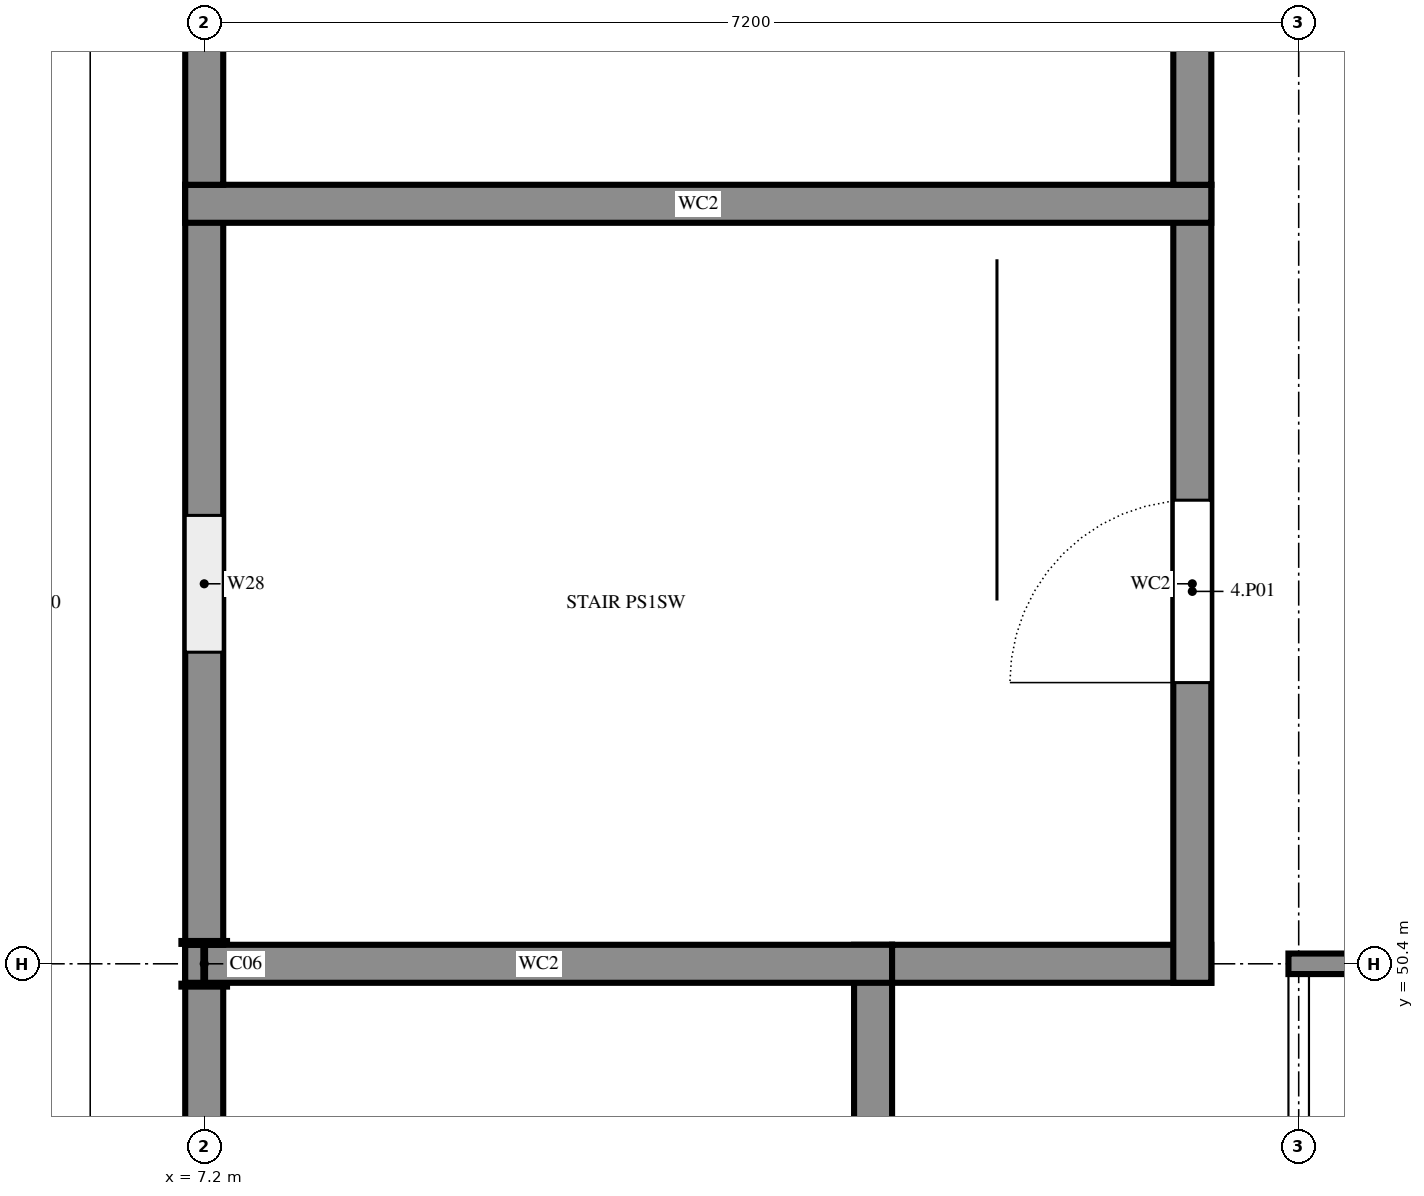
"""IFC4 building model, lengths in metres.
Left out: names, types, materials, properties, quantities, classifications, styles, units other than length and angle.
Written with IfcOpenShell. Run it as: python <this file> out.ifc"""

import sys

from ifc_helpers import new_model, si_unit, direction, frame, frame_2d, origin, origin_2d, place, context, subcontext, project, spatial, rectangle, i_section, extrude, element, fill, save


model = new_model("IFC4")
c1 = context("Model", 3, precision=1e-05, world=origin(), true_north=direction((0.0, 1.0)))
c2 = subcontext(c1, "Body", "Model", "MODEL_VIEW")
j1 = project(units=[si_unit("LENGTHUNIT", "METRE"), si_unit("PLANEANGLEUNIT", "RADIAN")], contexts=[c1])
p1 = place(None, origin())
s1 = spatial("IfcSite", under=j1, at=p1, CompositionType="ELEMENT")
p2 = place(p1, origin())
s2 = spatial("IfcBuilding", under=s1, at=p2, CompositionType="ELEMENT")
p3 = place(p2, frame((0.0, 0.0, 14.4)))
s3 = spatial("IfcBuildingStorey", under=s2, at=p3, CompositionType="ELEMENT", Elevation=14.4)
p4 = place(p3, frame((7.2, 50.4, 0.0), z_axis=(0.0, 0.0, 1.0), x_axis=(1.0, 0.0, 0.0)))
e1 = element("IfcColumn", 1, at=p4, inside=s3, PredefinedType="COLUMN", context=c2, shape_type="SweptSolid", body=[
    extrude(i_section(OverallWidth=0.3, OverallDepth=0.3, WebThickness=0.011, FlangeThickness=0.019, FilletRadius=0.027, at=origin_2d()), origin(), (0.0, 0.0, 1.0), 3.6),
])
p5 = place(p3, frame((11.6, 44.275, 0.0), z_axis=(0.0, 0.0, 1.0), x_axis=(0.0, 1.0, 0.0)))
e2 = element("IfcWall", 2, at=p5, inside=s3, PredefinedType="SHEAR", context=c2, shape_type="SweptSolid", body=[
    extrude(rectangle(XDim=6.25, YDim=0.25, at=frame_2d((3.125, 0.0))), origin(), (0.0, 0.0, 1.0), 3.6),
])
p6 = place(p5, frame((0.375, 0.0, 0.0)))
e3 = element("IfcOpeningElement", 3, at=p6, cuts=e2, PredefinedType="OPENING", context=c2, shape_type="SweptSolid", body=[
    extrude(rectangle(XDim=1.0, YDim=2.4, at=frame_2d((0.5, 1.2))), frame((0.0, 0.135, 0.0), z_axis=(0.0, -1.0, 0.0), x_axis=(1.0, 0.0, 0.0)), (0.0, 0.0, 1.0), 0.27),
])
p7 = place(p3, frame((7.2, 50.525, 0.0), z_axis=(0.0, 0.0, 1.0), x_axis=(0.0, -1.0, 0.0)))
e4 = element("IfcWall", 4, at=p7, inside=s3, PredefinedType="SHEAR", context=c2, shape_type="SweptSolid", body=[
    extrude(rectangle(XDim=6.25, YDim=0.25, at=frame_2d((3.125, 0.0))), origin(), (0.0, 0.0, 1.0), 3.6),
])
p8 = place(p7, frame((2.675, 0.0, 0.6)))
e5 = element("IfcOpeningElement", 5, at=p8, cuts=e4, PredefinedType="OPENING", context=c2, shape_type="SweptSolid", body=[
    extrude(rectangle(XDim=0.9, YDim=2.1, at=frame_2d((0.45, 1.05))), frame((0.0, 0.135, 0.0), z_axis=(0.0, -1.0, 0.0), x_axis=(1.0, 0.0, 0.0)), (0.0, 0.0, 1.0), 0.27),
])
p9 = place(p3, frame((11.725, 50.4, 0.0), z_axis=(0.0, 0.0, 1.0), x_axis=(-1.0, 0.0, 0.0)))
e6 = element("IfcWall", 6, at=p9, inside=s3, PredefinedType="SHEAR", context=c2, shape_type="SweptSolid", body=[
    extrude(rectangle(XDim=4.65, YDim=0.25, at=frame_2d((2.325, 0.0))), origin(), (0.0, 0.0, 1.0), 3.6),
])
p10 = place(p3, frame((11.725, 50.4, 0.0), z_axis=(0.0, 0.0, 1.0), x_axis=(1.0, 0.0, 0.0)))
e7 = element("IfcWall", 7, at=p10, inside=s3, PredefinedType="SHEAR", context=c2, shape_type="SweptSolid", body=[
    extrude(rectangle(XDim=2.1, YDim=0.25, at=frame_2d((1.05, 0.0))), origin(), (0.0, 0.0, 1.0), 3.6),
])
p11 = place(p3, frame((13.7, 50.275, 0.0), z_axis=(0.0, 0.0, 1.0), x_axis=(0.0, 1.0, 0.0)))
e8 = element("IfcWall", 8, at=p11, inside=s3, PredefinedType="SHEAR", context=c2, shape_type="SweptSolid", body=[
    extrude(rectangle(XDim=5.25, YDim=0.25, at=frame_2d((2.625, 0.0))), origin(), (0.0, 0.0, 1.0), 3.6),
])
p12 = place(p11, frame((1.975, 0.0, 0.0)))
e9 = element("IfcOpeningElement", 9, at=p12, cuts=e8, PredefinedType="OPENING", context=c2, shape_type="SweptSolid", body=[
    extrude(rectangle(XDim=1.2, YDim=2.4, at=frame_2d((0.6, 1.2))), frame((0.0, 0.135, 0.0), z_axis=(0.0, -1.0, 0.0), x_axis=(1.0, 0.0, 0.0)), (0.0, 0.0, 1.0), 0.27),
])
p13 = place(p3, frame((7.2, 55.525, 0.0), z_axis=(0.0, 0.0, 1.0), x_axis=(0.0, -1.0, 0.0)))
e10 = element("IfcWall", 10, at=p13, inside=s3, PredefinedType="SHEAR", context=c2, shape_type="SweptSolid", body=[
    extrude(rectangle(XDim=5.0, YDim=0.25, at=frame_2d((2.5, 0.0))), origin(), (0.0, 0.0, 1.0), 3.6),
])
p14 = place(p13, frame((2.175, 0.0, 0.6)))
e11 = element("IfcOpeningElement", 11, at=p14, cuts=e10, PredefinedType="OPENING", context=c2, shape_type="SweptSolid", body=[
    extrude(rectangle(XDim=0.9, YDim=2.1, at=frame_2d((0.45, 1.05))), frame((0.0, 0.135, 0.0), z_axis=(0.0, -1.0, 0.0), x_axis=(1.0, 0.0, 0.0)), (0.0, 0.0, 1.0), 0.27),
])
p15 = place(p3, frame((13.825, 55.4, 0.0), z_axis=(0.0, 0.0, 1.0), x_axis=(-1.0, 0.0, 0.0)))
e12 = element("IfcWall", 12, at=p15, inside=s3, PredefinedType="SHEAR", context=c2, shape_type="SweptSolid", body=[
    extrude(rectangle(XDim=6.75, YDim=0.25, at=frame_2d((3.375, 0.0))), origin(), (0.0, 0.0, 1.0), 3.6),
])
p16 = place(p3, frame((13.7, 55.525, 0.0), z_axis=(0.0, 0.0, 1.0), x_axis=(0.0, 1.0, 0.0)))
e13 = element("IfcWall", 13, at=p16, inside=s3, PredefinedType="SHEAR", context=c2, shape_type="SweptSolid", body=[
    extrude(rectangle(XDim=5.0, YDim=0.25, at=frame_2d((2.5, 0.0))), origin(), (0.0, 0.0, 1.0), 3.6),
])
p17 = place(p3, frame((7.2, 60.525, 0.0), z_axis=(0.0, 0.0, 1.0), x_axis=(0.0, -1.0, 0.0)))
e14 = element("IfcWall", 14, at=p17, inside=s3, PredefinedType="SHEAR", context=c2, shape_type="SweptSolid", body=[
    extrude(rectangle(XDim=5.0, YDim=0.25, at=frame_2d((2.5, 0.0))), origin(), (0.0, 0.0, 1.0), 3.6),
])
p18 = place(p17, frame((2.175, 0.0, 0.6)))
e15 = element("IfcOpeningElement", 15, at=p18, cuts=e14, PredefinedType="OPENING", context=c2, shape_type="SweptSolid", body=[
    extrude(rectangle(XDim=0.9, YDim=2.1, at=frame_2d((0.45, 1.05))), frame((0.0, 0.135, 0.0), z_axis=(0.0, -1.0, 0.0), x_axis=(1.0, 0.0, 0.0)), (0.0, 0.0, 1.0), 0.27),
])
p19 = place(p3, frame((14.4, 50.333, 0.0), z_axis=(0.0, 0.0, 1.0), x_axis=(0.0, -1.0, 0.0)))
e16 = element("IfcWall", 16, at=p19, inside=s3, PredefinedType="PARTITIONING", context=c2, shape_type="SweptSolid", body=[
    extrude(rectangle(XDim=14.265, YDim=0.135, at=frame_2d((7.133, 0.0))), origin(), (0.0, 0.0, 1.0), 3.12),
])
p20 = place(p19, frame((6.35, 0.0, 0.0)))
e17 = element("IfcOpeningElement", 17, at=p20, cuts=e16, PredefinedType="OPENING", context=c2, shape_type="SweptSolid", body=[
    extrude(rectangle(XDim=1.5, YDim=2.1, at=frame_2d((0.75, 1.05))), frame((0.0, 0.077, 0.0), z_axis=(0.0, -1.0, 0.0), x_axis=(1.0, 0.0, 0.0)), (0.0, 0.0, 1.0), 0.155),
])
p21 = place(p3, frame((18.0, 50.4, 0.0), z_axis=(0.0, 0.0, 1.0), x_axis=(-1.0, 0.0, 0.0)))
e18 = element("IfcWall", 18, at=p21, inside=s3, PredefinedType="PARTITIONING", context=c2, shape_type="SweptSolid", body=[
    extrude(rectangle(XDim=3.667, YDim=0.135, at=frame_2d((1.834, 0.0))), origin(), (0.0, 0.0, 1.0), 3.09),
])
p22 = place(p14, origin())
e19 = element("IfcWindow", 19, at=p22, inside=s3, PartitioningType="SINGLE_PANEL", PredefinedType="WINDOW", context=c2, shape_type="SweptSolid", body=[
    extrude(rectangle(XDim=0.9, YDim=2.1, at=frame_2d((0.45, 1.05))), frame((0.0, 0.03, 0.0), z_axis=(0.0, -1.0, 0.0), x_axis=(1.0, 0.0, 0.0)), (0.0, 0.0, 1.0), 0.06),
])
fill(e11, e19)
p23 = place(p12, origin())
e20 = element("IfcDoor", 20, at=p23, inside=s3, OperationType="SINGLE_SWING_RIGHT", PredefinedType="DOOR", context=c2, shape_type="SweptSolid", body=[
    extrude(rectangle(XDim=1.2, YDim=2.4, at=frame_2d((0.6, 1.2))), frame((0.0, 0.025, 0.0), z_axis=(0.0, -1.0, 0.0), x_axis=(1.0, 0.0, 0.0)), (0.0, 0.0, 1.0), 0.05),
])
fill(e9, e20)
save(model, sys.argv[1])
